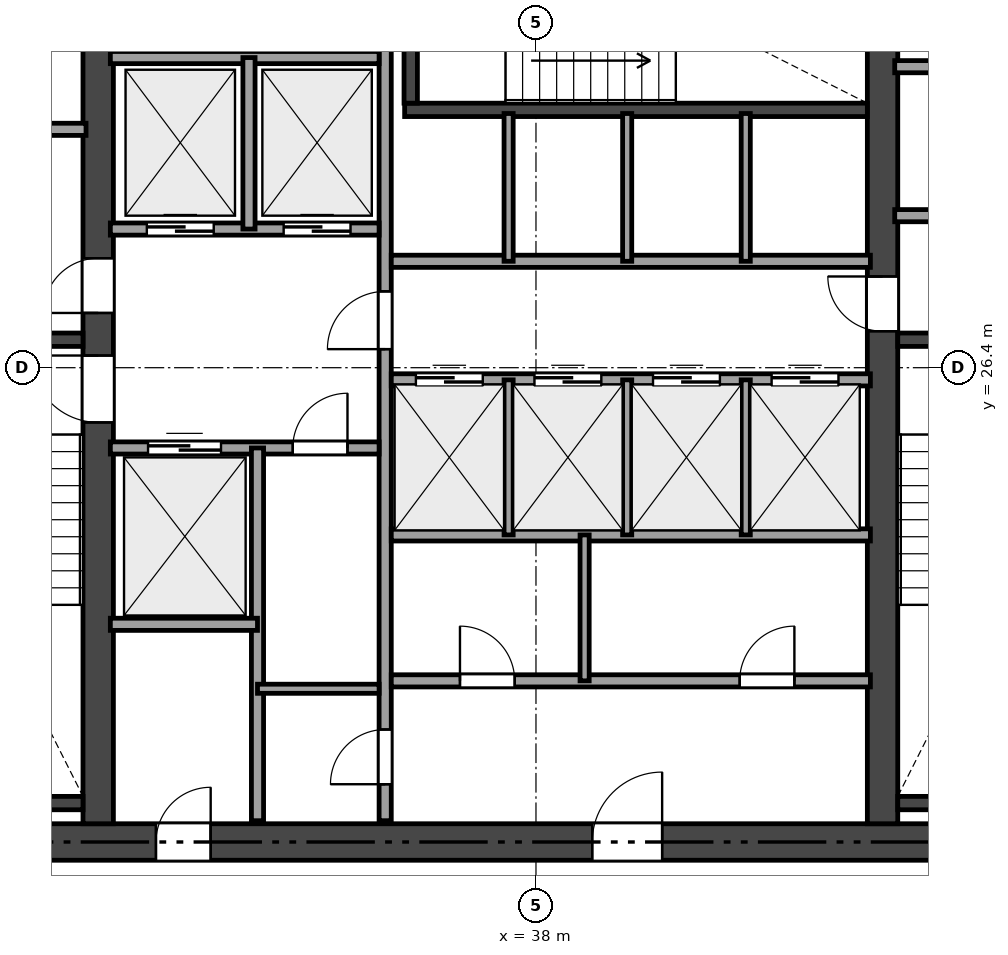
"""IFC4 building model, lengths in metres.
Left out: names, types, materials, properties, quantities, classifications, styles, units other than length and angle.
Written with IfcOpenShell. Run it as: python <this file> out.ifc"""

import sys

from ifc_helpers import new_model, si_unit, direction, frame, frame_2d, origin, place, context, subcontext, project, spatial, rectangle, extrude, element, fill, save


model = new_model("IFC4")
c1 = context("Model", 3, precision=1e-05, world=origin(), true_north=direction((0.0, 1.0)))
c2 = subcontext(c1, "Body", "Model", "MODEL_VIEW")
j1 = project(units=[si_unit("LENGTHUNIT", "METRE"), si_unit("PLANEANGLEUNIT", "RADIAN")], contexts=[c1])
p1 = place(None, origin())
s1 = spatial("IfcSite", under=j1, at=p1, CompositionType="ELEMENT")
p2 = place(p1, origin())
s2 = spatial("IfcBuilding", under=s1, at=p2, CompositionType="ELEMENT")
p3 = place(p2, frame((0.0, 0.0, 129.3)))
s3 = spatial("IfcBuildingStorey", under=s2, at=p3, CompositionType="ELEMENT", Elevation=129.3)
p4 = place(p3, frame((26.5, 18.6, 0.0), z_axis=(0.0, 0.0, 1.0), x_axis=(1.0, 0.0, 0.0)))
e1 = element("IfcWall", 1, at=p4, inside=s3, PredefinedType="SHEAR", context=c2, shape_type="SweptSolid", body=[
    extrude(rectangle(XDim=21.4, YDim=0.6, at=frame_2d((10.7, 0.0))), origin(), (0.0, 0.0, 1.0), 3.32),
])
p5 = place(p4, frame((12.425, 0.0, 0.0)))
e2 = element("IfcOpeningElement", 2, at=p5, cuts=e1, PredefinedType="OPENING", context=c2, shape_type="SweptSolid", body=[
    extrude(rectangle(XDim=1.15, YDim=2.15, at=frame_2d((0.575, 1.075))), frame((0.0, 0.31, 0.0), z_axis=(0.0, -1.0, 0.0), x_axis=(1.0, 0.0, 0.0)), (0.0, 0.0, 1.0), 0.62),
])
p6 = place(p4, frame((5.25, 0.0, 0.0)))
e3 = element("IfcOpeningElement", 3, at=p6, cuts=e1, PredefinedType="OPENING", context=c2, shape_type="SweptSolid", body=[
    extrude(rectangle(XDim=0.9, YDim=2.1, at=frame_2d((0.45, 1.05))), frame((0.0, 0.31, 0.0), z_axis=(0.0, -1.0, 0.0), x_axis=(1.0, 0.0, 0.0)), (0.0, 0.0, 1.0), 0.62),
])
p7 = place(p3, frame((30.8, 18.9, 0.0), z_axis=(0.0, 0.0, 1.0), x_axis=(0.0, 1.0, 0.0)))
e4 = element("IfcWall", 4, at=p7, inside=s3, PredefinedType="SHEAR", context=c2, shape_type="SweptSolid", body=[
    extrude(rectangle(XDim=15.0, YDim=0.5, at=frame_2d((7.5, 0.0))), origin(), (0.0, 0.0, 1.0), 3.32),
])
p8 = place(p7, frame((6.6, 0.0, 0.0)))
e5 = element("IfcOpeningElement", 5, at=p8, cuts=e4, PredefinedType="OPENING", context=c2, shape_type="SweptSolid", body=[
    extrude(rectangle(XDim=1.1, YDim=2.15, at=frame_2d((0.55, 1.075))), frame((0.0, 0.26, 0.0), z_axis=(0.0, -1.0, 0.0), x_axis=(1.0, 0.0, 0.0)), (0.0, 0.0, 1.0), 0.52),
])
p9 = place(p7, frame((8.4, 0.0, 0.0)))
e6 = element("IfcOpeningElement", 6, at=p9, cuts=e4, PredefinedType="OPENING", context=c2, shape_type="SweptSolid", body=[
    extrude(rectangle(XDim=0.9, YDim=2.1, at=frame_2d((0.45, 1.05))), frame((0.0, 0.26, 0.0), z_axis=(0.0, -1.0, 0.0), x_axis=(1.0, 0.0, 0.0)), (0.0, 0.0, 1.0), 0.52),
])
p10 = place(p3, frame((43.7, 18.9, 0.0), z_axis=(0.0, 0.0, 1.0), x_axis=(0.0, 1.0, 0.0)))
e7 = element("IfcWall", 7, at=p10, inside=s3, PredefinedType="SHEAR", context=c2, shape_type="SweptSolid", body=[
    extrude(rectangle(XDim=15.0, YDim=0.5, at=frame_2d((7.5, 0.0))), origin(), (0.0, 0.0, 1.0), 3.32),
])
p11 = place(p10, frame((8.1, 0.0, 0.0)))
e8 = element("IfcOpeningElement", 8, at=p11, cuts=e7, PredefinedType="OPENING", context=c2, shape_type="SweptSolid", body=[
    extrude(rectangle(XDim=0.9, YDim=2.1, at=frame_2d((0.45, 1.05))), frame((0.0, 0.26, 0.0), z_axis=(0.0, -1.0, 0.0), x_axis=(1.0, 0.0, 0.0)), (0.0, 0.0, 1.0), 0.52),
])
for number, where, z_axis, x_axis in (
    (9, (27.1, 26.86, 0.0), (0.0, 0.0, 1.0), (1.0, 0.0, 0.0)),
    (10, (27.1, 19.24, 0.0), (0.0, 0.0, 1.0), (1.0, 0.0, 0.0)),
):
    element("IfcWall", number, at=place(p3, frame(where, z_axis=z_axis, x_axis=x_axis)), inside=s3, PredefinedType="SHEAR", context=c2, shape_type="SweptSolid", body=[
        extrude(rectangle(XDim=3.45, YDim=0.22, at=frame_2d((1.725, 0.0))), origin(), (0.0, 0.0, 1.0), 3.32),
    ])
for number, where, z_axis, x_axis in (
    (11, (43.95, 26.86, 0.0), (0.0, 0.0, 1.0), (1.0, 0.0, 0.0)),
    (12, (43.95, 19.24, 0.0), (0.0, 0.0, 1.0), (1.0, 0.0, 0.0)),
):
    element("IfcWall", number, at=place(p3, frame(where, z_axis=z_axis, x_axis=x_axis)), inside=s3, PredefinedType="SHEAR", context=c2, shape_type="SweptSolid", body=[
        extrude(rectangle(XDim=3.35, YDim=0.22, at=frame_2d((1.675, 0.0))), origin(), (0.0, 0.0, 1.0), 3.32),
    ])
p12 = place(p3, frame((35.84, 30.64, 0.0), z_axis=(0.0, 0.0, 1.0), x_axis=(1.0, 0.0, 0.0)))
e13 = element("IfcWall", 13, at=p12, inside=s3, PredefinedType="SHEAR", context=c2, shape_type="SweptSolid", body=[
    extrude(rectangle(XDim=7.61, YDim=0.22, at=frame_2d((3.805, 0.0))), origin(), (0.0, 0.0, 1.0), 3.32),
])
p13 = place(p3, frame((35.94, 30.75, 0.0), z_axis=(0.0, 0.0, 1.0), x_axis=(0.0, 1.0, 0.0)))
e14 = element("IfcWall", 14, at=p13, inside=s3, PredefinedType="SHEAR", context=c2, shape_type="SweptSolid", body=[
    extrude(rectangle(XDim=3.15, YDim=0.22, at=frame_2d((1.575, 0.0))), origin(), (0.0, 0.0, 1.0), 3.32),
])
p14 = place(p3, frame((27.15, 30.32, 0.0), z_axis=(0.0, 0.0, 1.0), x_axis=(1.0, 0.0, 0.0)))
e15 = element("IfcWall", 15, at=p14, inside=s3, PredefinedType="SOLIDWALL", context=c2, shape_type="SweptSolid", body=[
    extrude(rectangle(XDim=3.45, YDim=0.2, at=frame_2d((1.725, 0.0))), origin(), (0.0, 0.0, 1.0), 3.32),
])
p15 = place(p3, frame((43.9, 28.9, 0.0), z_axis=(0.0, 0.0, 1.0), x_axis=(1.0, 0.0, 0.0)))
e16 = element("IfcWall", 16, at=p15, inside=s3, PredefinedType="SOLIDWALL", context=c2, shape_type="SweptSolid", body=[
    extrude(rectangle(XDim=3.35, YDim=0.2, at=frame_2d((1.675, 0.0))), origin(), (0.0, 0.0, 1.0), 3.32),
])
p16 = place(p15, frame((1.15, 0.0, 0.0)))
e17 = element("IfcOpeningElement", 17, at=p16, cuts=e16, PredefinedType="OPENING", context=c2, shape_type="SweptSolid", body=[
    extrude(rectangle(XDim=0.9, YDim=2.1, at=frame_2d((0.45, 1.05))), frame((0.0, 0.11, 0.0), z_axis=(0.0, -1.0, 0.0), x_axis=(1.0, 0.0, 0.0)), (0.0, 0.0, 1.0), 0.22),
])
p17 = place(p3, frame((43.9, 31.35, 0.0), z_axis=(0.0, 0.0, 1.0), x_axis=(1.0, 0.0, 0.0)))
e18 = element("IfcWall", 18, at=p17, inside=s3, PredefinedType="SOLIDWALL", context=c2, shape_type="SweptSolid", body=[
    extrude(rectangle(XDim=3.35, YDim=0.2, at=frame_2d((1.675, 0.0))), origin(), (0.0, 0.0, 1.0), 2.949),
])
p18 = place(p3, frame((35.52, 18.95, 0.0), z_axis=(0.0, 0.0, 1.0), x_axis=(0.0, 1.0, 0.0)))
e19 = element("IfcWall", 19, at=p18, inside=s3, PredefinedType="SOLIDWALL", context=c2, shape_type="SweptSolid", body=[
    extrude(rectangle(XDim=14.9, YDim=0.2, at=frame_2d((7.45, 0.0))), origin(), (0.0, 0.0, 1.0), 2.841),
])
p19 = place(p18, frame((7.755, 0.0, 0.0)))
e20 = element("IfcOpeningElement", 20, at=p19, cuts=e19, PredefinedType="OPENING", context=c2, shape_type="SweptSolid", body=[
    extrude(rectangle(XDim=0.95, YDim=2.15, at=frame_2d((0.475, 1.075))), frame((0.0, 0.11, 0.0), z_axis=(0.0, -1.0, 0.0), x_axis=(1.0, 0.0, 0.0)), (0.0, 0.0, 1.0), 0.22),
])
p20 = place(p18, frame((0.6, 0.0, 0.0)))
e21 = element("IfcOpeningElement", 21, at=p20, cuts=e19, PredefinedType="OPENING", context=c2, shape_type="SweptSolid", body=[
    extrude(rectangle(XDim=0.9, YDim=2.1, at=frame_2d((0.45, 1.05))), frame((0.0, 0.11, 0.0), z_axis=(0.0, -1.0, 0.0), x_axis=(1.0, 0.0, 0.0)), (0.0, 0.0, 1.0), 0.22),
])
p21 = place(p3, frame((31.0, 28.68, 0.0), z_axis=(0.0, 0.0, 1.0), x_axis=(1.0, 0.0, 0.0)))
e22 = element("IfcWall", 22, at=p21, inside=s3, PredefinedType="SOLIDWALL", context=c2, shape_type="SweptSolid", body=[
    extrude(rectangle(XDim=4.42, YDim=0.2, at=frame_2d((2.21, 0.0))), origin(), (0.0, 0.0, 1.0), 3.32),
])
p22 = place(p21, frame((0.6, 0.0, 0.0)))
e23 = element("IfcOpeningElement", 23, at=p22, cuts=e22, PredefinedType="OPENING", context=c2, shape_type="SweptSolid", body=[
    extrude(rectangle(XDim=1.1, YDim=2.15, at=frame_2d((0.55, 1.075))), frame((0.0, 0.11, 0.0), z_axis=(0.0, -1.0, 0.0), x_axis=(1.0, 0.0, 0.0)), (0.0, 0.0, 1.0), 0.22),
])
p23 = place(p21, frame((2.85, 0.0, 0.0)))
e24 = element("IfcOpeningElement", 24, at=p23, cuts=e22, PredefinedType="OPENING", context=c2, shape_type="SweptSolid", body=[
    extrude(rectangle(XDim=1.1, YDim=2.15, at=frame_2d((0.55, 1.075))), frame((0.0, 0.11, 0.0), z_axis=(0.0, -1.0, 0.0), x_axis=(1.0, 0.0, 0.0)), (0.0, 0.0, 1.0), 0.22),
])
p24 = place(p3, frame((31.0, 31.5, 0.0), z_axis=(0.0, 0.0, 1.0), x_axis=(1.0, 0.0, 0.0)))
e25 = element("IfcWall", 25, at=p24, inside=s3, PredefinedType="SOLIDWALL", context=c2, shape_type="SweptSolid", body=[
    extrude(rectangle(XDim=4.42, YDim=0.2, at=frame_2d((2.21, 0.0))), origin(), (0.0, 0.0, 1.0), 3.32),
])
p25 = place(p3, frame((33.28, 28.68, 0.0), z_axis=(0.0, 0.0, 1.0), x_axis=(0.0, 1.0, 0.0)))
e26 = element("IfcWall", 26, at=p25, inside=s3, PredefinedType="SOLIDWALL", context=c2, shape_type="SweptSolid", body=[
    extrude(rectangle(XDim=2.82, YDim=0.2, at=frame_2d((1.41, 0.0))), origin(), (0.0, 0.0, 1.0), 3.32),
])
p26 = place(p3, frame((31.0, 25.08, 0.0), z_axis=(0.0, 0.0, 1.0), x_axis=(1.0, 0.0, 0.0)))
e27 = element("IfcWall", 27, at=p26, inside=s3, PredefinedType="SOLIDWALL", context=c2, shape_type="SweptSolid", body=[
    extrude(rectangle(XDim=4.42, YDim=0.2, at=frame_2d((2.21, 0.0))), origin(), (0.0, 0.0, 1.0), 3.32),
])
p27 = place(p26, frame((3.0, 0.0, 0.0)))
e28 = element("IfcOpeningElement", 28, at=p27, cuts=e27, PredefinedType="OPENING", context=c2, shape_type="SweptSolid", body=[
    extrude(rectangle(XDim=0.9, YDim=2.1, at=frame_2d((0.45, 1.05))), frame((0.0, 0.11, 0.0), z_axis=(0.0, -1.0, 0.0), x_axis=(1.0, 0.0, 0.0)), (0.0, 0.0, 1.0), 0.22),
])
p28 = place(p26, frame((0.62, 0.0, 0.0)))
e29 = element("IfcOpeningElement", 29, at=p28, cuts=e27, PredefinedType="OPENING", context=c2, shape_type="SweptSolid", body=[
    extrude(rectangle(XDim=1.2, YDim=2.15, at=frame_2d((0.6, 1.075))), frame((0.0, 0.11, 0.0), z_axis=(0.0, -1.0, 0.0), x_axis=(1.0, 0.0, 0.0)), (0.0, 0.0, 1.0), 0.22),
])
p29 = place(p3, frame((33.42, 18.95, 0.0), z_axis=(0.0, 0.0, 1.0), x_axis=(0.0, 1.0, 0.0)))
e30 = element("IfcWall", 30, at=p29, inside=s3, PredefinedType="SOLIDWALL", context=c2, shape_type="SweptSolid", body=[
    extrude(rectangle(XDim=6.13, YDim=0.2, at=frame_2d((3.065, 0.0))), origin(), (0.0, 0.0, 1.0), 2.841),
])
p30 = place(p3, frame((31.0, 22.18, 0.0), z_axis=(0.0, 0.0, 1.0), x_axis=(1.0, 0.0, 0.0)))
e31 = element("IfcWall", 31, at=p30, inside=s3, PredefinedType="SOLIDWALL", context=c2, shape_type="SweptSolid", body=[
    extrude(rectangle(XDim=2.42, YDim=0.2, at=frame_2d((1.21, 0.0))), origin(), (0.0, 0.0, 1.0), 3.32),
])
p31 = place(p3, frame((33.42, 21.12, 0.0), z_axis=(0.0, 0.0, 1.0), x_axis=(1.0, 0.0, 0.0)))
e32 = element("IfcWall", 32, at=p31, inside=s3, PredefinedType="PARTITIONING", context=c2, shape_type="SweptSolid", body=[
    extrude(rectangle(XDim=2.0, YDim=0.15, at=frame_2d((1.0, 0.0))), origin(), (0.0, 0.0, 1.0), 3.32),
])
p32 = place(p3, frame((35.62, 28.15, 0.0), z_axis=(0.0, 0.0, 1.0), x_axis=(1.0, 0.0, 0.0)))
e33 = element("IfcWall", 33, at=p32, inside=s3, PredefinedType="SOLIDWALL", context=c2, shape_type="SweptSolid", body=[
    extrude(rectangle(XDim=7.88, YDim=0.2, at=frame_2d((3.94, 0.0))), origin(), (0.0, 0.0, 1.0), 3.32),
])
p33 = place(p3, frame((35.62, 26.2, 0.0), z_axis=(0.0, 0.0, 1.0), x_axis=(1.0, 0.0, 0.0)))
e34 = element("IfcWall", 34, at=p33, inside=s3, PredefinedType="SOLIDWALL", context=c2, shape_type="SweptSolid", body=[
    extrude(rectangle(XDim=7.88, YDim=0.2, at=frame_2d((3.94, 0.0))), origin(), (0.0, 0.0, 1.0), 3.32),
])
p34 = place(p33, frame((0.405, 0.0, 0.0)))
e35 = element("IfcOpeningElement", 35, at=p34, cuts=e34, PredefinedType="OPENING", context=c2, shape_type="SweptSolid", body=[
    extrude(rectangle(XDim=1.1, YDim=2.15, at=frame_2d((0.55, 1.075))), frame((0.0, 0.11, 0.0), z_axis=(0.0, -1.0, 0.0), x_axis=(1.0, 0.0, 0.0)), (0.0, 0.0, 1.0), 0.22),
])
p35 = place(p33, frame((2.355, 0.0, 0.0)))
e36 = element("IfcOpeningElement", 36, at=p35, cuts=e34, PredefinedType="OPENING", context=c2, shape_type="SweptSolid", body=[
    extrude(rectangle(XDim=1.1, YDim=2.15, at=frame_2d((0.55, 1.075))), frame((0.0, 0.11, 0.0), z_axis=(0.0, -1.0, 0.0), x_axis=(1.0, 0.0, 0.0)), (0.0, 0.0, 1.0), 0.22),
])
p36 = place(p33, frame((4.305, 0.0, 0.0)))
e37 = element("IfcOpeningElement", 37, at=p36, cuts=e34, PredefinedType="OPENING", context=c2, shape_type="SweptSolid", body=[
    extrude(rectangle(XDim=1.1, YDim=2.15, at=frame_2d((0.55, 1.075))), frame((0.0, 0.11, 0.0), z_axis=(0.0, -1.0, 0.0), x_axis=(1.0, 0.0, 0.0)), (0.0, 0.0, 1.0), 0.22),
])
p37 = place(p33, frame((6.255, 0.0, 0.0)))
e38 = element("IfcOpeningElement", 38, at=p37, cuts=e34, PredefinedType="OPENING", context=c2, shape_type="SweptSolid", body=[
    extrude(rectangle(XDim=1.1, YDim=2.15, at=frame_2d((0.55, 1.075))), frame((0.0, 0.11, 0.0), z_axis=(0.0, -1.0, 0.0), x_axis=(1.0, 0.0, 0.0)), (0.0, 0.0, 1.0), 0.22),
])
p38 = place(p3, frame((35.62, 23.65, 0.0), z_axis=(0.0, 0.0, 1.0), x_axis=(1.0, 0.0, 0.0)))
e39 = element("IfcWall", 39, at=p38, inside=s3, PredefinedType="SOLIDWALL", context=c2, shape_type="SweptSolid", body=[
    extrude(rectangle(XDim=7.88, YDim=0.2, at=frame_2d((3.94, 0.0))), origin(), (0.0, 0.0, 1.0), 2.841),
])
p39 = place(p3, frame((35.62, 21.25, 0.0), z_axis=(0.0, 0.0, 1.0), x_axis=(1.0, 0.0, 0.0)))
e40 = element("IfcWall", 40, at=p39, inside=s3, PredefinedType="SOLIDWALL", context=c2, shape_type="SweptSolid", body=[
    extrude(rectangle(XDim=7.88, YDim=0.2, at=frame_2d((3.94, 0.0))), origin(), (0.0, 0.0, 1.0), 3.32),
])
p40 = place(p39, frame((1.13, 0.0, 0.0)))
e41 = element("IfcOpeningElement", 41, at=p40, cuts=e40, PredefinedType="OPENING", context=c2, shape_type="SweptSolid", body=[
    extrude(rectangle(XDim=0.9, YDim=2.1, at=frame_2d((0.45, 1.05))), frame((0.0, 0.11, 0.0), z_axis=(0.0, -1.0, 0.0), x_axis=(1.0, 0.0, 0.0)), (0.0, 0.0, 1.0), 0.22),
])
p41 = place(p39, frame((5.73, 0.0, 0.0)))
e42 = element("IfcOpeningElement", 42, at=p41, cuts=e40, PredefinedType="OPENING", context=c2, shape_type="SweptSolid", body=[
    extrude(rectangle(XDim=0.9, YDim=2.1, at=frame_2d((0.45, 1.05))), frame((0.0, 0.11, 0.0), z_axis=(0.0, -1.0, 0.0), x_axis=(1.0, 0.0, 0.0)), (0.0, 0.0, 1.0), 0.22),
])
for number, where, z_axis, x_axis in (
    (43, (37.55, 28.15, 0.0), (0.0, 0.0, 1.0), (0.0, 1.0, 0.0)),
    (44, (39.5, 28.15, 0.0), (0.0, 0.0, 1.0), (0.0, 1.0, 0.0)),
    (45, (41.45, 28.15, 0.0), (0.0, 0.0, 1.0), (0.0, 1.0, 0.0)),
):
    element("IfcWall", number, at=place(p3, frame(where, z_axis=z_axis, x_axis=x_axis)), inside=s3, PredefinedType="PARTITIONING", context=c2, shape_type="SweptSolid", body=[
        extrude(rectangle(XDim=2.43, YDim=0.15, at=frame_2d((1.215, 0.0))), origin(), (0.0, 0.0, 1.0), 3.32),
    ])
for number, where, z_axis, x_axis in (
    (46, (37.55, 23.65, 0.0), (0.0, 0.0, 1.0), (0.0, 1.0, 0.0)),
    (47, (39.5, 23.65, 0.0), (0.0, 0.0, 1.0), (0.0, 1.0, 0.0)),
    (48, (41.45, 23.65, 0.0), (0.0, 0.0, 1.0), (0.0, 1.0, 0.0)),
):
    element("IfcWall", number, at=place(p3, frame(where, z_axis=z_axis, x_axis=x_axis)), inside=s3, PredefinedType="PARTITIONING", context=c2, shape_type="SweptSolid", body=[
        extrude(rectangle(XDim=2.55, YDim=0.15, at=frame_2d((1.275, 0.0))), origin(), (0.0, 0.0, 1.0), 2.841),
    ])
p42 = place(p3, frame((38.8, 21.25, 0.0), z_axis=(0.0, 0.0, 1.0), x_axis=(0.0, 1.0, 0.0)))
e49 = element("IfcWall", 49, at=p42, inside=s3, PredefinedType="PARTITIONING", context=c2, shape_type="SweptSolid", body=[
    extrude(rectangle(XDim=2.4, YDim=0.15, at=frame_2d((1.2, 0.0))), origin(), (0.0, 0.0, 1.0), 2.841),
])
p43 = place(p8, origin())
e50 = element("IfcDoor", 50, at=p43, inside=s3, OperationType="SINGLE_SWING_RIGHT", PredefinedType="DOOR", context=c2, shape_type="SweptSolid", body=[
    extrude(rectangle(XDim=1.1, YDim=2.15, at=frame_2d((0.55, 1.075))), frame((0.0, 0.025, 0.0), z_axis=(0.0, -1.0, 0.0), x_axis=(1.0, 0.0, 0.0)), (0.0, 0.0, 1.0), 0.05),
])
fill(e5, e50)
p44 = place(p19, origin())
e51 = element("IfcDoor", 51, at=p44, inside=s3, OperationType="SINGLE_SWING_LEFT", PredefinedType="DOOR", context=c2, shape_type="SweptSolid", body=[
    extrude(rectangle(XDim=0.95, YDim=2.15, at=frame_2d((0.475, 1.075))), frame((0.0, 0.025, 0.0), z_axis=(0.0, -1.0, 0.0), x_axis=(1.0, 0.0, 0.0)), (0.0, 0.0, 1.0), 0.05),
])
fill(e20, e51)
p45 = place(p11, origin())
e52 = element("IfcDoor", 52, at=p45, inside=s3, OperationType="SINGLE_SWING_RIGHT", PredefinedType="DOOR", context=c2, shape_type="SweptSolid", body=[
    extrude(rectangle(XDim=0.9, YDim=2.1, at=frame_2d((0.45, 1.05))), frame((0.0, 0.025, 0.0), z_axis=(0.0, -1.0, 0.0), x_axis=(1.0, 0.0, 0.0)), (0.0, 0.0, 1.0), 0.05),
])
fill(e8, e52)
p46 = place(p5, origin())
e53 = element("IfcDoor", 53, at=p46, inside=s3, OperationType="SINGLE_SWING_RIGHT", PredefinedType="DOOR", context=c2, shape_type="SweptSolid", body=[
    extrude(rectangle(XDim=1.15, YDim=2.15, at=frame_2d((0.575, 1.075))), frame((0.0, 0.025, 0.0), z_axis=(0.0, -1.0, 0.0), x_axis=(1.0, 0.0, 0.0)), (0.0, 0.0, 1.0), 0.05),
])
fill(e2, e53)
p47 = place(p9, origin())
e54 = element("IfcDoor", 54, at=p47, inside=s3, OperationType="SINGLE_SWING_LEFT", PredefinedType="DOOR", context=c2, shape_type="SweptSolid", body=[
    extrude(rectangle(XDim=0.9, YDim=2.1, at=frame_2d((0.45, 1.05))), frame((0.0, 0.025, 0.0), z_axis=(0.0, -1.0, 0.0), x_axis=(1.0, 0.0, 0.0)), (0.0, 0.0, 1.0), 0.05),
])
fill(e6, e54)
p48 = place(p6, origin())
e55 = element("IfcDoor", 55, at=p48, inside=s3, OperationType="SINGLE_SWING_RIGHT", PredefinedType="DOOR", context=c2, shape_type="SweptSolid", body=[
    extrude(rectangle(XDim=0.9, YDim=2.1, at=frame_2d((0.45, 1.05))), frame((0.0, 0.025, 0.0), z_axis=(0.0, -1.0, 0.0), x_axis=(1.0, 0.0, 0.0)), (0.0, 0.0, 1.0), 0.05),
])
fill(e3, e55)
p49 = place(p20, origin())
e56 = element("IfcDoor", 56, at=p49, inside=s3, OperationType="SINGLE_SWING_LEFT", PredefinedType="DOOR", context=c2, shape_type="SweptSolid", body=[
    extrude(rectangle(XDim=0.9, YDim=2.1, at=frame_2d((0.45, 1.05))), frame((0.0, 0.025, 0.0), z_axis=(0.0, -1.0, 0.0), x_axis=(1.0, 0.0, 0.0)), (0.0, 0.0, 1.0), 0.05),
])
fill(e21, e56)
p50 = place(p27, origin())
e57 = element("IfcDoor", 57, at=p50, inside=s3, OperationType="SINGLE_SWING_RIGHT", PredefinedType="DOOR", context=c2, shape_type="SweptSolid", body=[
    extrude(rectangle(XDim=0.9, YDim=2.1, at=frame_2d((0.45, 1.05))), frame((0.0, 0.025, 0.0), z_axis=(0.0, -1.0, 0.0), x_axis=(1.0, 0.0, 0.0)), (0.0, 0.0, 1.0), 0.05),
])
fill(e28, e57)
p51 = place(p40, origin())
e58 = element("IfcDoor", 58, at=p51, inside=s3, OperationType="SINGLE_SWING_LEFT", PredefinedType="DOOR", context=c2, shape_type="SweptSolid", body=[
    extrude(rectangle(XDim=0.9, YDim=2.1, at=frame_2d((0.45, 1.05))), frame((0.0, 0.025, 0.0), z_axis=(0.0, -1.0, 0.0), x_axis=(1.0, 0.0, 0.0)), (0.0, 0.0, 1.0), 0.05),
])
fill(e41, e58)
p52 = place(p41, origin())
e59 = element("IfcDoor", 59, at=p52, inside=s3, OperationType="SINGLE_SWING_RIGHT", PredefinedType="DOOR", context=c2, shape_type="SweptSolid", body=[
    extrude(rectangle(XDim=0.9, YDim=2.1, at=frame_2d((0.45, 1.05))), frame((0.0, 0.025, 0.0), z_axis=(0.0, -1.0, 0.0), x_axis=(1.0, 0.0, 0.0)), (0.0, 0.0, 1.0), 0.05),
])
fill(e42, e59)
p53 = place(p22, origin())
e60 = element("IfcDoor", 60, at=p53, inside=s3, OperationType="SLIDING_TO_LEFT", PredefinedType="DOOR", context=c2, shape_type="SweptSolid", body=[
    extrude(rectangle(XDim=1.1, YDim=2.15, at=frame_2d((0.55, 1.075))), frame((0.0, 0.025, 0.0), z_axis=(0.0, -1.0, 0.0), x_axis=(1.0, 0.0, 0.0)), (0.0, 0.0, 1.0), 0.05),
])
fill(e23, e60)
p54 = place(p23, origin())
e61 = element("IfcDoor", 61, at=p54, inside=s3, OperationType="SLIDING_TO_LEFT", PredefinedType="DOOR", context=c2, shape_type="SweptSolid", body=[
    extrude(rectangle(XDim=1.1, YDim=2.15, at=frame_2d((0.55, 1.075))), frame((0.0, 0.025, 0.0), z_axis=(0.0, -1.0, 0.0), x_axis=(1.0, 0.0, 0.0)), (0.0, 0.0, 1.0), 0.05),
])
fill(e24, e61)
p55 = place(p28, origin())
e62 = element("IfcDoor", 62, at=p55, inside=s3, OperationType="SLIDING_TO_LEFT", PredefinedType="DOOR", context=c2, shape_type="SweptSolid", body=[
    extrude(rectangle(XDim=1.2, YDim=2.15, at=frame_2d((0.6, 1.075))), frame((0.0, 0.025, 0.0), z_axis=(0.0, -1.0, 0.0), x_axis=(1.0, 0.0, 0.0)), (0.0, 0.0, 1.0), 0.05),
])
fill(e29, e62)
p56 = place(p34, origin())
e63 = element("IfcDoor", 63, at=p56, inside=s3, OperationType="SLIDING_TO_LEFT", PredefinedType="DOOR", context=c2, shape_type="SweptSolid", body=[
    extrude(rectangle(XDim=1.1, YDim=2.15, at=frame_2d((0.55, 1.075))), frame((0.0, 0.025, 0.0), z_axis=(0.0, -1.0, 0.0), x_axis=(1.0, 0.0, 0.0)), (0.0, 0.0, 1.0), 0.05),
])
fill(e35, e63)
p57 = place(p35, origin())
e64 = element("IfcDoor", 64, at=p57, inside=s3, OperationType="SLIDING_TO_LEFT", PredefinedType="DOOR", context=c2, shape_type="SweptSolid", body=[
    extrude(rectangle(XDim=1.1, YDim=2.15, at=frame_2d((0.55, 1.075))), frame((0.0, 0.025, 0.0), z_axis=(0.0, -1.0, 0.0), x_axis=(1.0, 0.0, 0.0)), (0.0, 0.0, 1.0), 0.05),
])
fill(e36, e64)
p58 = place(p36, origin())
e65 = element("IfcDoor", 65, at=p58, inside=s3, OperationType="SLIDING_TO_LEFT", PredefinedType="DOOR", context=c2, shape_type="SweptSolid", body=[
    extrude(rectangle(XDim=1.1, YDim=2.15, at=frame_2d((0.55, 1.075))), frame((0.0, 0.025, 0.0), z_axis=(0.0, -1.0, 0.0), x_axis=(1.0, 0.0, 0.0)), (0.0, 0.0, 1.0), 0.05),
])
fill(e37, e65)
p59 = place(p37, origin())
e66 = element("IfcDoor", 66, at=p59, inside=s3, OperationType="SLIDING_TO_LEFT", PredefinedType="DOOR", context=c2, shape_type="SweptSolid", body=[
    extrude(rectangle(XDim=1.1, YDim=2.15, at=frame_2d((0.55, 1.075))), frame((0.0, 0.025, 0.0), z_axis=(0.0, -1.0, 0.0), x_axis=(1.0, 0.0, 0.0)), (0.0, 0.0, 1.0), 0.05),
])
fill(e38, e66)
save(model, sys.argv[1])
